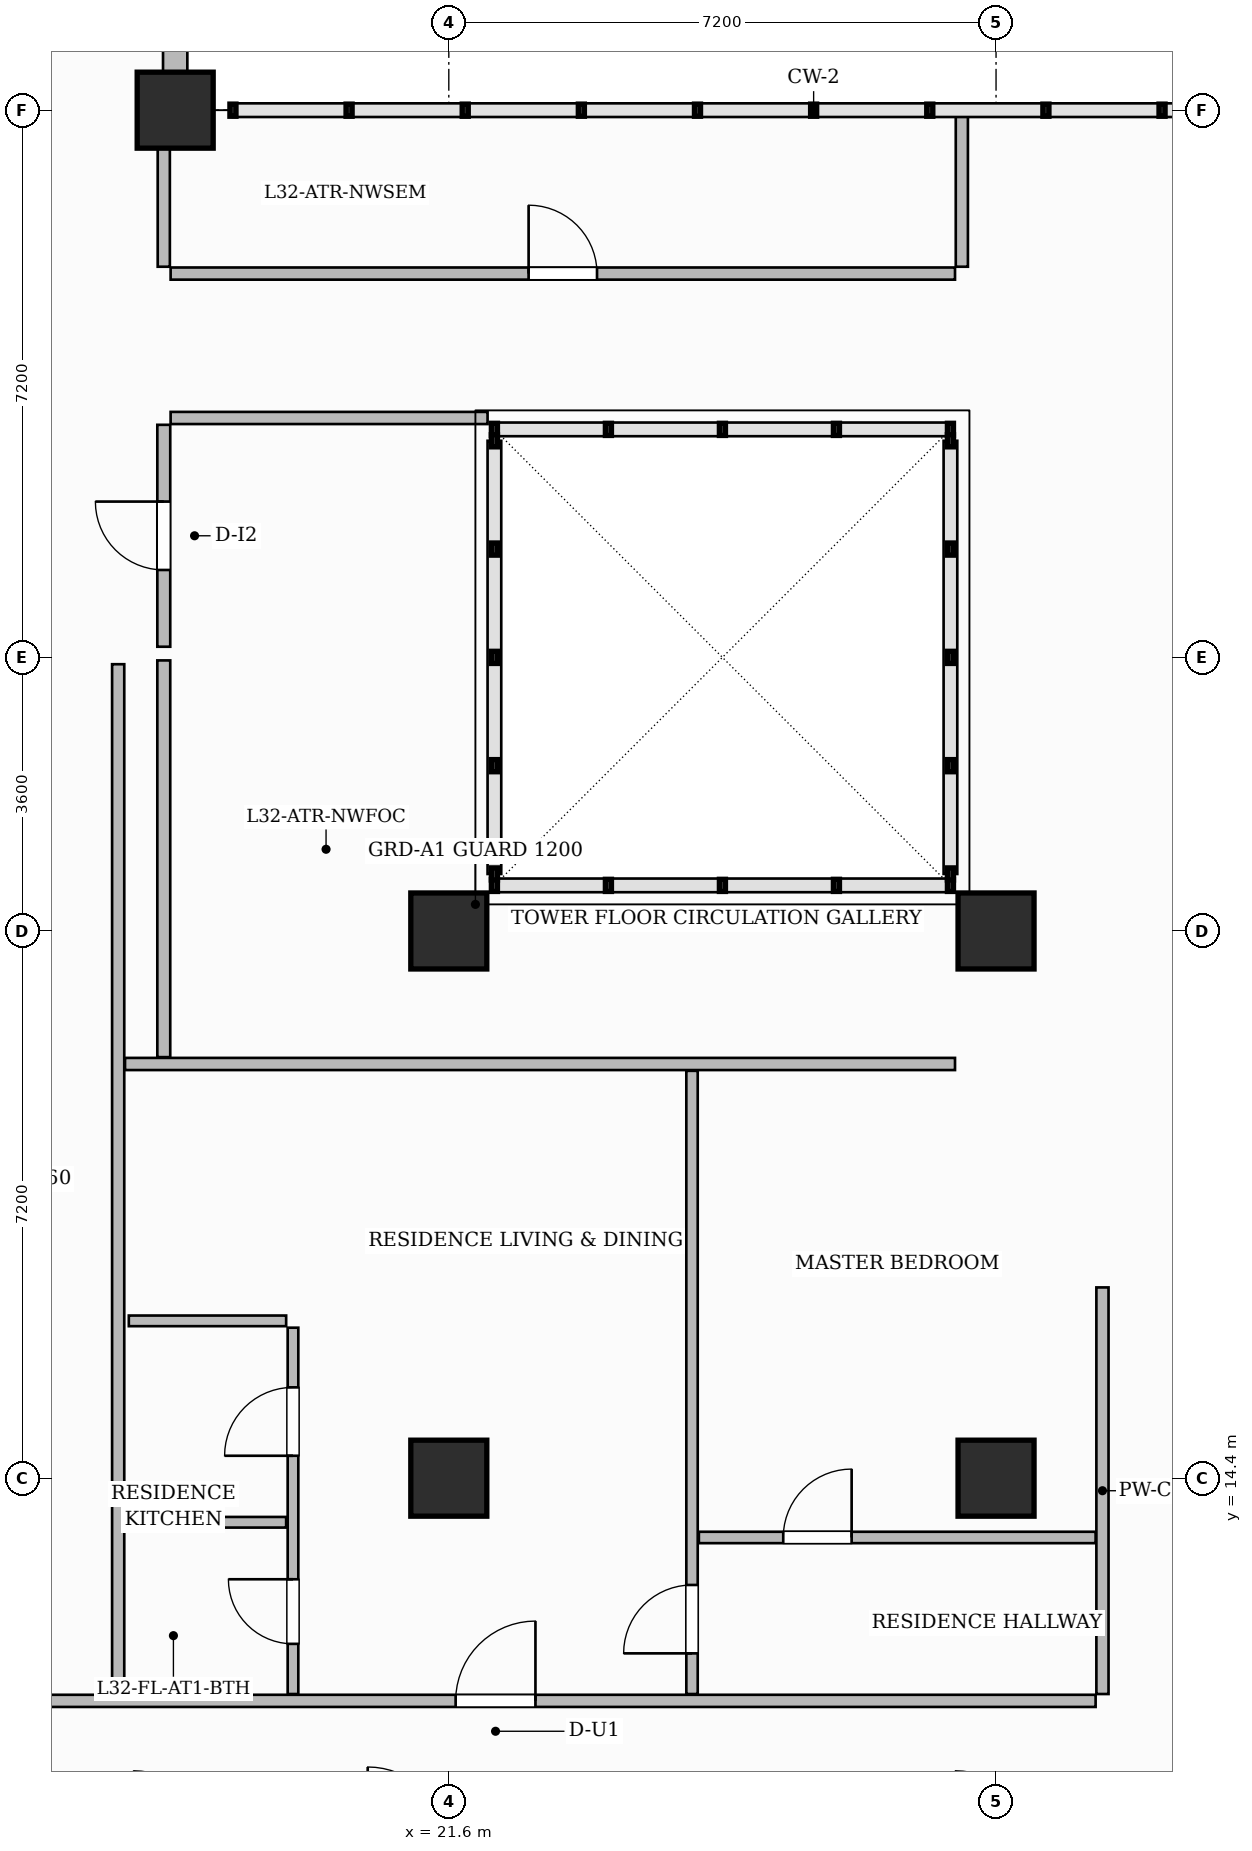
"""IFC4 building model, lengths in metres.
Left out: names, types, materials, properties, quantities, classifications, styles, units other than length and angle.
Written with IfcOpenShell. Run it as: python <this file> out.ifc"""

import sys

from ifc_helpers import new_model, si_unit, direction, frame, frame_2d, origin, origin_2d, place, context, subcontext, project, spatial, rectangle, extrude, source, transform, mapped, element, fill, save


model = new_model("IFC4")
c1 = context("Model", 3, precision=1e-05, world=origin(), true_north=direction((0.0, 1.0)))
c2 = subcontext(c1, "Body", "Model", "MODEL_VIEW")
j1 = project(units=[si_unit("LENGTHUNIT", "METRE"), si_unit("PLANEANGLEUNIT", "RADIAN")], contexts=[c1])
p1 = place(None, origin())
s1 = spatial("IfcSite", under=j1, at=p1, CompositionType="ELEMENT")
p2 = place(p1, origin())
s2 = spatial("IfcBuilding", under=s1, at=p2, CompositionType="ELEMENT")
p3 = place(p2, frame((0.0, 0.0, 130.3)))
s3 = spatial("IfcBuildingStorey", under=s2, at=p3, CompositionType="ELEMENT", Elevation=130.3)
m1 = source(origin(), c2, "Body", "SweptSolid", [
    extrude(rectangle(XDim=1.0, YDim=1.0, at=origin_2d()), origin(), (0.0, 0.0, 1.0), 3.7),
])
for number, where, z_axis, x_axis in (
    (1, (21.6, 14.4, 0.0), (0.0, 0.0, 1.0), (1.0, 0.0, 0.0)),
    (2, (21.6, 21.6, 0.0), (0.0, 0.0, 1.0), (1.0, 0.0, 0.0)),
    (3, (28.8, 14.4, 0.0), (0.0, 0.0, 1.0), (1.0, 0.0, 0.0)),
    (4, (28.8, 21.6, 0.0), (0.0, 0.0, 1.0), (1.0, 0.0, 0.0)),
    (5, (18.0, 32.4, 0.0), (0.0, 0.0, 1.0), (1.0, 0.0, 0.0)),
):
    element("IfcColumn", number, at=place(p3, frame(where, z_axis=z_axis, x_axis=x_axis)), inside=s3, PredefinedType="COLUMN", context=c2, shape_type="MappedRepresentation", body=[
        mapped(m1, transform((0.0, 0.0, 0.0), scale=1.0)),
    ])
p4 = place(p3, frame((14.568, 11.47, 0.0), z_axis=(0.0, 0.0, 1.0), x_axis=(1.0, 0.0, 0.0)))
e6 = element("IfcWall", 6, at=p4, inside=s3, PredefinedType="PARTITIONING", context=c2, shape_type="SweptSolid", body=[
    extrude(rectangle(XDim=15.542, YDim=0.16, at=frame_2d((7.771, 0.0))), origin(), (0.0, 0.0, 1.0), 3.45),
])
p5 = place(p4, frame((7.122, 0.0, 0.0)))
e7 = element("IfcOpeningElement", 7, at=p5, cuts=e6, PredefinedType="OPENING", context=c2, shape_type="SweptSolid", body=[
    extrude(rectangle(XDim=1.05, YDim=2.25, at=frame_2d((0.525, 1.125))), frame((0.0, 0.09, 0.0), z_axis=(0.0, -1.0, 0.0), x_axis=(1.0, 0.0, 0.0)), (0.0, 0.0, 1.0), 0.18),
])
p6 = place(p3, frame((30.2, 11.56, 0.0), z_axis=(0.0, 0.0, 1.0), x_axis=(0.0, 1.0, 0.0)))
e8 = element("IfcWall", 8, at=p6, inside=s3, PredefinedType="PARTITIONING", context=c2, shape_type="SweptSolid", body=[
    extrude(rectangle(XDim=5.35, YDim=0.16, at=frame_2d((2.675, 0.0))), origin(), (0.0, 0.0, 1.0), 3.45),
])
p7 = place(p3, frame((17.25, 11.56, 0.0), z_axis=(0.0, 0.0, 1.0), x_axis=(0.0, 1.0, 0.0)))
e9 = element("IfcWall", 9, at=p7, inside=s3, PredefinedType="PARTITIONING", context=c2, shape_type="SweptSolid", body=[
    extrude(rectangle(XDim=13.55, YDim=0.16, at=frame_2d((6.775, 0.0))), origin(), (0.0, 0.0, 1.0), 3.45),
])
p8 = place(p3, frame((17.85, 19.94, 0.0), z_axis=(0.0, 0.0, 1.0), x_axis=(0.0, 1.0, 0.0)))
e10 = element("IfcWall", 10, at=p8, inside=s3, PredefinedType="PARTITIONING", context=c2, shape_type="SweptSolid", body=[
    extrude(rectangle(XDim=5.22, YDim=0.17, at=frame_2d((2.61, 0.0))), origin(), (0.0, 0.0, 1.0), 3.105),
])
p9 = place(p3, frame((17.85, 30.34, 0.0), z_axis=(0.0, 0.0, 1.0), x_axis=(0.0, 1.0, 0.0)))
e11 = element("IfcWall", 11, at=p9, inside=s3, PredefinedType="PARTITIONING", context=c2, shape_type="SweptSolid", body=[
    extrude(rectangle(XDim=1.87, YDim=0.16, at=frame_2d((0.935, 0.0))), origin(), (0.0, 0.0, 1.0), 3.45),
])
p10 = place(p3, frame((28.35, 30.34, 0.0), z_axis=(0.0, 0.0, 1.0), x_axis=(0.0, 1.0, 0.0)))
e12 = element("IfcWall", 12, at=p10, inside=s3, PredefinedType="PARTITIONING", context=c2, shape_type="SweptSolid", body=[
    extrude(rectangle(XDim=2.032, YDim=0.16, at=frame_2d((1.016, 0.0))), origin(), (0.0, 0.0, 1.0), 3.45),
])
p11 = place(p3, frame((17.94, 28.35, 0.0), z_axis=(0.0, 0.0, 1.0), x_axis=(1.0, 0.0, 0.0)))
e13 = element("IfcWall", 13, at=p11, inside=s3, PredefinedType="PARTITIONING", context=c2, shape_type="SweptSolid", body=[
    extrude(rectangle(XDim=4.17, YDim=0.16, at=frame_2d((2.085, 0.0))), origin(), (0.0, 0.0, 1.0), 3.45),
])
p12 = place(p3, frame((17.94, 30.25, 0.0), z_axis=(0.0, 0.0, 1.0), x_axis=(1.0, 0.0, 0.0)))
e14 = element("IfcWall", 14, at=p12, inside=s3, PredefinedType="PARTITIONING", context=c2, shape_type="SweptSolid", body=[
    extrude(rectangle(XDim=10.32, YDim=0.16, at=frame_2d((5.16, 0.0))), origin(), (0.0, 0.0, 1.0), 3.45),
])
p13 = place(p12, frame((4.71, 0.0, 0.0)))
e15 = element("IfcOpeningElement", 15, at=p13, cuts=e14, PredefinedType="OPENING", context=c2, shape_type="SweptSolid", body=[
    extrude(rectangle(XDim=0.9, YDim=2.15, at=frame_2d((0.45, 1.075))), frame((0.0, 0.09, 0.0), z_axis=(0.0, -1.0, 0.0), x_axis=(1.0, 0.0, 0.0)), (0.0, 0.0, 1.0), 0.18),
])
p14 = place(p3, frame((17.85, 25.34, 0.0), z_axis=(0.0, 0.0, 1.0), x_axis=(0.0, 1.0, 0.0)))
e16 = element("IfcWall", 16, at=p14, inside=s3, PredefinedType="PARTITIONING", context=c2, shape_type="SweptSolid", body=[
    extrude(rectangle(XDim=2.92, YDim=0.17, at=frame_2d((1.46, 0.0))), origin(), (0.0, 0.0, 1.0), 3.45),
])
p15 = place(p14, frame((1.01, 0.0, 0.0)))
e17 = element("IfcOpeningElement", 17, at=p15, cuts=e16, PredefinedType="OPENING", context=c2, shape_type="SweptSolid", body=[
    extrude(rectangle(XDim=0.9, YDim=2.15, at=frame_2d((0.45, 1.075))), frame((0.0, 0.095, 0.0), z_axis=(0.0, -1.0, 0.0), x_axis=(1.0, 0.0, 0.0)), (0.0, 0.0, 1.0), 0.19),
])
p16 = place(p3, frame((17.34, 19.85, 0.0), z_axis=(0.0, 0.0, 1.0), x_axis=(1.0, 0.0, 0.0)))
e18 = element("IfcWall", 18, at=p16, inside=s3, PredefinedType="PARTITIONING", context=c2, shape_type="SweptSolid", body=[
    extrude(rectangle(XDim=10.92, YDim=0.16, at=frame_2d((5.46, 0.0))), origin(), (0.0, 0.0, 1.0), 3.45),
])
p17 = place(p3, frame((19.55, 11.56, 0.0), z_axis=(0.0, 0.0, 1.0), x_axis=(0.0, 1.0, 0.0)))
e19 = element("IfcWall", 19, at=p17, inside=s3, PredefinedType="PARTITIONING", context=c2, shape_type="SweptSolid", body=[
    extrude(rectangle(XDim=4.82, YDim=0.14, at=frame_2d((2.41, 0.0))), origin(), (0.0, 0.0, 1.0), 3.45),
])
p18 = place(p17, frame((0.66, 0.0, 0.0)))
e20 = element("IfcOpeningElement", 20, at=p18, cuts=e19, PredefinedType="OPENING", context=c2, shape_type="SweptSolid", body=[
    extrude(rectangle(XDim=0.85, YDim=2.1, at=frame_2d((0.425, 1.05))), frame((0.0, 0.08, 0.0), z_axis=(0.0, -1.0, 0.0), x_axis=(1.0, 0.0, 0.0)), (0.0, 0.0, 1.0), 0.16),
])
p19 = place(p17, frame((3.135, 0.0, 0.0)))
e21 = element("IfcOpeningElement", 21, at=p19, cuts=e19, PredefinedType="OPENING", context=c2, shape_type="SweptSolid", body=[
    extrude(rectangle(XDim=0.9, YDim=2.15, at=frame_2d((0.45, 1.075))), frame((0.0, 0.08, 0.0), z_axis=(0.0, -1.0, 0.0), x_axis=(1.0, 0.0, 0.0)), (0.0, 0.0, 1.0), 0.16),
])
for number, where, z_axis, x_axis in (
    (22, (17.39, 13.82, 0.0), (0.0, 0.0, 1.0), (1.0, 0.0, 0.0)),
    (23, (17.39, 16.47, 0.0), (0.0, 0.0, 1.0), (1.0, 0.0, 0.0)),
):
    element("IfcWall", number, at=place(p3, frame(where, z_axis=z_axis, x_axis=x_axis)), inside=s3, PredefinedType="PARTITIONING", context=c2, shape_type="SweptSolid", body=[
        extrude(rectangle(XDim=2.07, YDim=0.14, at=frame_2d((1.035, 0.0))), origin(), (0.0, 0.0, 1.0), 3.45),
    ])
p20 = place(p3, frame((24.8, 11.56, 0.0), z_axis=(0.0, 0.0, 1.0), x_axis=(0.0, 1.0, 0.0)))
e24 = element("IfcWall", 24, at=p20, inside=s3, PredefinedType="PARTITIONING", context=c2, shape_type="SweptSolid", body=[
    extrude(rectangle(XDim=8.2, YDim=0.15, at=frame_2d((4.1, 0.0))), origin(), (0.0, 0.0, 1.0), 3.45),
])
p21 = place(p20, frame((0.535, 0.0, 0.0)))
e25 = element("IfcOpeningElement", 25, at=p21, cuts=e24, PredefinedType="OPENING", context=c2, shape_type="SweptSolid", body=[
    extrude(rectangle(XDim=0.9, YDim=2.15, at=frame_2d((0.45, 1.075))), frame((0.0, 0.085, 0.0), z_axis=(0.0, -1.0, 0.0), x_axis=(1.0, 0.0, 0.0)), (0.0, 0.0, 1.0), 0.17),
])
p22 = place(p3, frame((24.89, 13.62, 0.0), z_axis=(0.0, 0.0, 1.0), x_axis=(1.0, 0.0, 0.0)))
e26 = element("IfcWall", 26, at=p22, inside=s3, PredefinedType="PARTITIONING", context=c2, shape_type="SweptSolid", body=[
    extrude(rectangle(XDim=5.22, YDim=0.15, at=frame_2d((2.61, 0.0))), origin(), (0.0, 0.0, 1.0), 3.45),
])
p23 = place(p22, frame((1.11, 0.0, 0.0)))
e27 = element("IfcOpeningElement", 27, at=p23, cuts=e26, PredefinedType="OPENING", context=c2, shape_type="SweptSolid", body=[
    extrude(rectangle(XDim=0.9, YDim=2.15, at=frame_2d((0.45, 1.075))), frame((0.0, 0.085, 0.0), z_axis=(0.0, -1.0, 0.0), x_axis=(1.0, 0.0, 0.0)), (0.0, 0.0, 1.0), 0.17),
])
p24 = place(p3, frame((18.0, 32.4, 0.0), z_axis=(0.0, 0.0, 1.0), x_axis=(0.0, 1.0, 0.0)))
e28 = element("IfcWall", 28, at=p24, inside=s3, PredefinedType="SOLIDWALL", context=c2, shape_type="SweptSolid", body=[
    extrude(rectangle(XDim=14.35, YDim=0.32, at=frame_2d((7.175, 0.0))), origin(), (0.0, 0.0, 1.0), 3.45),
])
p25 = place(p24, frame((0.85, 0.0, 0.0)))
e29 = element("IfcOpeningElement", 29, at=p25, cuts=e28, PredefinedType="OPENING", context=c2, shape_type="SweptSolid", body=[
    extrude(rectangle(XDim=1.2, YDim=2.2, at=frame_2d((0.6, 1.1))), frame((0.0, 0.17, 0.0), z_axis=(0.0, -1.0, 0.0), x_axis=(1.0, 0.0, 0.0)), (0.0, 0.0, 1.0), 0.34),
])
p26 = place(p24, frame((3.475, 0.0, 0.8)))
e30 = element("IfcOpeningElement", 30, at=p26, cuts=e28, PredefinedType="OPENING", context=c2, shape_type="SweptSolid", body=[
    extrude(rectangle(XDim=1.8, YDim=1.85, at=frame_2d((0.9, 0.925))), frame((0.0, 0.17, 0.0), z_axis=(0.0, -1.0, 0.0), x_axis=(1.0, 0.0, 0.0)), (0.0, 0.0, 1.0), 0.34),
])
p27 = place(p24, frame((8.525, 0.0, 0.8)))
e31 = element("IfcOpeningElement", 31, at=p27, cuts=e28, PredefinedType="OPENING", context=c2, shape_type="SweptSolid", body=[
    extrude(rectangle(XDim=1.8, YDim=1.85, at=frame_2d((0.9, 0.925))), frame((0.0, 0.17, 0.0), z_axis=(0.0, -1.0, 0.0), x_axis=(1.0, 0.0, 0.0)), (0.0, 0.0, 1.0), 0.34),
])
p28 = place(p24, frame((11.275, 0.0, 0.8)))
e32 = element("IfcOpeningElement", 32, at=p28, cuts=e28, PredefinedType="OPENING", context=c2, shape_type="SweptSolid", body=[
    extrude(rectangle(XDim=1.8, YDim=1.85, at=frame_2d((0.9, 0.925))), frame((0.0, 0.17, 0.0), z_axis=(0.0, -1.0, 0.0), x_axis=(1.0, 0.0, 0.0)), (0.0, 0.0, 1.0), 0.34),
])
m2 = source(origin(), c2, "Body", "SweptSolid", [
    extrude(rectangle(XDim=0.9, YDim=2.15, at=frame_2d((0.45, 1.075))), frame((0.0, 0.025, 0.0), z_axis=(0.0, -1.0, 0.0), x_axis=(1.0, 0.0, 0.0)), (0.0, 0.0, 1.0), 0.05),
])
p29 = place(p15, origin())
e33 = element("IfcDoor", 33, at=p29, inside=s3, OperationType="SINGLE_SWING_RIGHT", PredefinedType="DOOR", context=c2, shape_type="MappedRepresentation", body=[
    mapped(m2, transform((0.0, 0.0, 0.0), scale=1.0)),
])
fill(e17, e33)
p30 = place(p13, origin())
e34 = element("IfcDoor", 34, at=p30, inside=s3, OperationType="SINGLE_SWING_LEFT", PredefinedType="DOOR", context=c2, shape_type="MappedRepresentation", body=[
    mapped(m2, transform((0.0, 0.0, 0.0), scale=1.0)),
])
fill(e15, e34)
m3 = source(origin(), c2, "Body", "SweptSolid", [
    extrude(rectangle(XDim=0.85, YDim=2.1, at=frame_2d((0.425, 1.05))), frame((0.0, 0.025, 0.0), z_axis=(0.0, -1.0, 0.0), x_axis=(1.0, 0.0, 0.0)), (0.0, 0.0, 1.0), 0.05),
])
p31 = place(p18, origin())
e35 = element("IfcDoor", 35, at=p31, inside=s3, OperationType="SINGLE_SWING_RIGHT", PredefinedType="DOOR", context=c2, shape_type="MappedRepresentation", body=[
    mapped(m3, transform((0.0, 0.0, 0.0), scale=1.0)),
])
fill(e20, e35)
p32 = place(p19, origin())
e36 = element("IfcDoor", 36, at=p32, inside=s3, OperationType="SINGLE_SWING_LEFT", PredefinedType="DOOR", context=c2, shape_type="MappedRepresentation", body=[
    mapped(m2, transform((0.0, 0.0, 0.0), scale=1.0)),
])
fill(e21, e36)
m4 = source(origin(), c2, "Body", "SweptSolid", [
    extrude(rectangle(XDim=1.05, YDim=2.25, at=frame_2d((0.525, 1.125))), frame((0.0, 0.025, 0.0), z_axis=(0.0, -1.0, 0.0), x_axis=(1.0, 0.0, 0.0)), (0.0, 0.0, 1.0), 0.05),
])
p33 = place(p5, origin())
e37 = element("IfcDoor", 37, at=p33, inside=s3, OperationType="SINGLE_SWING_RIGHT", PredefinedType="DOOR", context=c2, shape_type="MappedRepresentation", body=[
    mapped(m4, transform((0.0, 0.0, 0.0), scale=1.0)),
])
fill(e7, e37)
p34 = place(p21, origin())
e38 = element("IfcDoor", 38, at=p34, inside=s3, OperationType="SINGLE_SWING_LEFT", PredefinedType="DOOR", context=c2, shape_type="MappedRepresentation", body=[
    mapped(m2, transform((0.0, 0.0, 0.0), scale=1.0)),
])
fill(e25, e38)
p35 = place(p23, origin())
e39 = element("IfcDoor", 39, at=p35, inside=s3, OperationType="SINGLE_SWING_RIGHT", PredefinedType="DOOR", context=c2, shape_type="MappedRepresentation", body=[
    mapped(m2, transform((0.0, 0.0, 0.0), scale=1.0)),
])
fill(e27, e39)
save(model, sys.argv[1])
